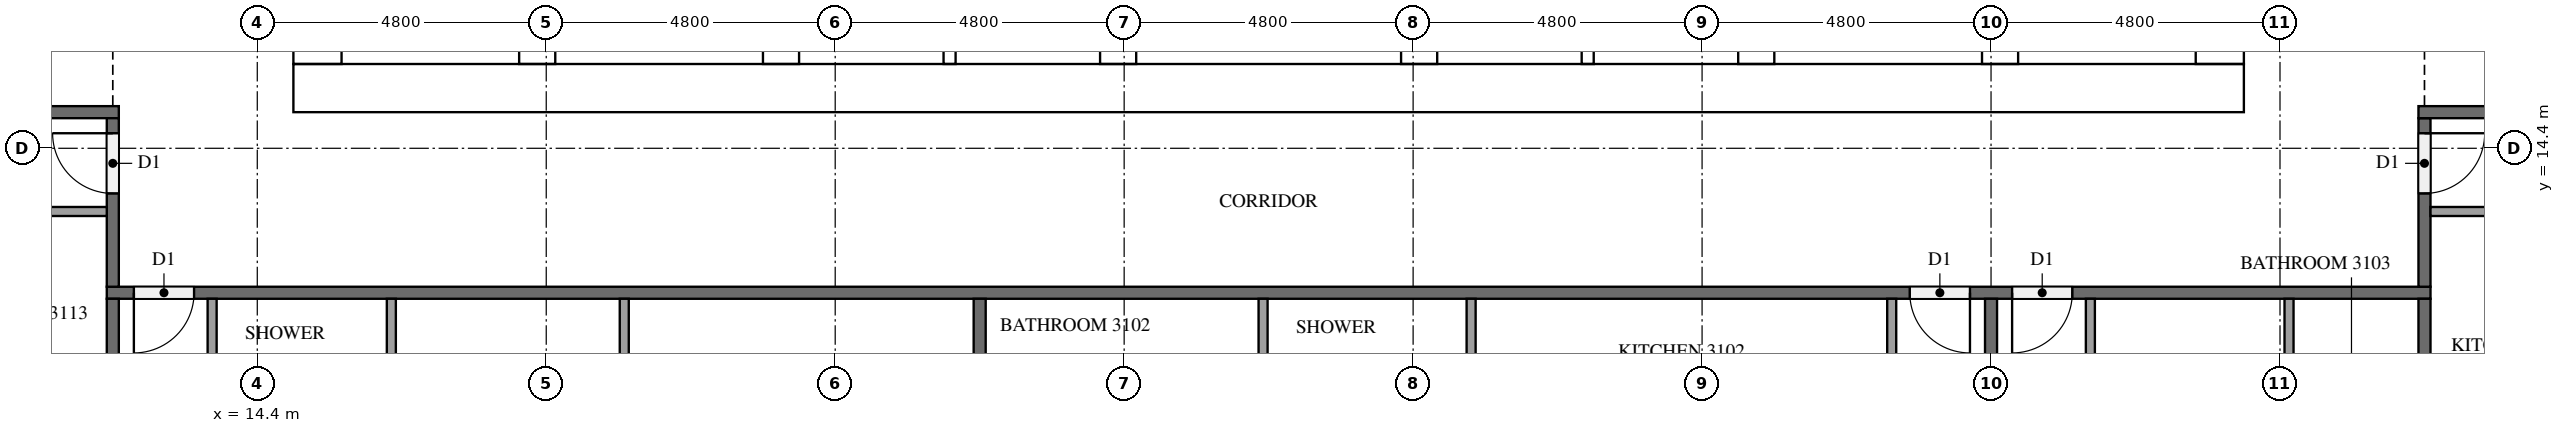
"""IFC4 building model, lengths in metres.
Left out: names, types, materials, properties, quantities, classifications, styles, units other than length and angle.
Written with IfcOpenShell. Run it as: python <this file> out.ifc"""

import sys

from ifc_helpers import new_model, si_unit, direction, frame, frame_2d, origin, place, context, subcontext, project, spatial, rectangle, extrude, element, fill, save


model = new_model("IFC4")
c1 = context("Model", 3, precision=1e-05, world=origin(), true_north=direction((0.0, 1.0)))
c2 = subcontext(c1, "Body", "Model", "MODEL_VIEW")
j1 = project(units=[si_unit("LENGTHUNIT", "METRE"), si_unit("PLANEANGLEUNIT", "RADIAN")], contexts=[c1])
p1 = place(None, origin())
s1 = spatial("IfcSite", under=j1, at=p1, CompositionType="ELEMENT")
p2 = place(p1, origin())
s2 = spatial("IfcBuilding", under=s1, at=p2, CompositionType="ELEMENT")
p3 = place(p2, frame((0.0, 0.0, 122.6)))
s3 = spatial("IfcBuildingStorey", under=s2, at=p3, CompositionType="ELEMENT", Elevation=122.6)
p4 = place(p3, frame((15.0, 15.4, 0.0), z_axis=(0.0, 0.0, 1.0), x_axis=(1.0, 0.0, 0.0)))
e1 = element("IfcWall", 1, at=p4, inside=s3, PredefinedType="SHEAR", context=c2, shape_type="SweptSolid", body=[
    extrude(rectangle(XDim=32.4, YDim=0.8, at=frame_2d((16.2, 0.0))), origin(), (0.0, 0.0, 1.0), 3.2),
])
p5 = place(p4, frame((15.3, 0.0, 0.0)))
e2 = element("IfcOpeningElement", 2, at=p5, cuts=e1, PredefinedType="OPENING", context=c2, shape_type="SweptSolid", body=[
    extrude(rectangle(XDim=1.8, YDim=2.1, at=frame_2d((0.9, 1.05))), frame((0.0, 0.41, 0.0), z_axis=(0.0, -1.0, 0.0), x_axis=(1.0, 0.0, 0.0)), (0.0, 0.0, 1.0), 0.82),
])
p6 = place(p3, frame((15.4, 15.8, 0.0), z_axis=(0.0, 0.0, 1.0), x_axis=(0.0, 1.0, 0.0)))
e3 = element("IfcWall", 3, at=p6, inside=s3, PredefinedType="SHEAR", context=c2, shape_type="SweptSolid", body=[
    extrude(rectangle(XDim=21.2, YDim=0.8, at=frame_2d((10.6, 0.0))), origin(), (0.0, 0.0, 1.0), 3.2),
])
p7 = place(p6, frame((4.96, 0.0, 0.0)))
e4 = element("IfcOpeningElement", 4, at=p7, cuts=e3, PredefinedType="OPENING", context=c2, shape_type="SweptSolid", body=[
    extrude(rectangle(XDim=1.2, YDim=2.1, at=frame_2d((0.6, 1.05))), frame((0.0, 0.41, 0.0), z_axis=(0.0, -1.0, 0.0), x_axis=(1.0, 0.0, 0.0)), (0.0, 0.0, 1.0), 0.82),
])
p8 = place(p3, frame((47.0, 15.8, 0.0), z_axis=(0.0, 0.0, 1.0), x_axis=(0.0, 1.0, 0.0)))
e5 = element("IfcWall", 5, at=p8, inside=s3, PredefinedType="SHEAR", context=c2, shape_type="SweptSolid", body=[
    extrude(rectangle(XDim=21.2, YDim=0.8, at=frame_2d((10.6, 0.0))), origin(), (0.0, 0.0, 1.0), 3.2),
])
p9 = place(p8, frame((10.3, 0.0, 0.0)))
e6 = element("IfcOpeningElement", 6, at=p9, cuts=e5, PredefinedType="OPENING", context=c2, shape_type="SweptSolid", body=[
    extrude(rectangle(XDim=1.2, YDim=2.1, at=frame_2d((0.6, 1.05))), frame((0.0, 0.41, 0.0), z_axis=(0.0, -1.0, 0.0), x_axis=(1.0, 0.0, 0.0)), (0.0, 0.0, 1.0), 0.82),
])
p10 = place(p3, frame((19.05, 15.8, 0.0), z_axis=(0.0, 0.0, 1.0), x_axis=(0.0, 1.0, 0.0)))
e7 = element("IfcWall", 7, at=p10, inside=s3, PredefinedType="SHEAR", context=c2, shape_type="SweptSolid", body=[
    extrude(rectangle(XDim=15.15, YDim=0.6, at=frame_2d((7.575, 0.0))), origin(), (0.0, 0.0, 1.0), 3.2),
])
p11 = place(p10, frame((9.65, 0.0, 0.0)))
e8 = element("IfcOpeningElement", 8, at=p11, cuts=e7, PredefinedType="OPENING", context=c2, shape_type="SweptSolid", body=[
    extrude(rectangle(XDim=1.1, YDim=2.1, at=frame_2d((0.55, 1.05))), frame((0.0, 0.31, 0.0), z_axis=(0.0, -1.0, 0.0), x_axis=(1.0, 0.0, 0.0)), (0.0, 0.0, 1.0), 0.62),
])
p12 = place(p10, frame((13.15, 0.0, 0.0)))
e9 = element("IfcOpeningElement", 9, at=p12, cuts=e7, PredefinedType="OPENING", context=c2, shape_type="SweptSolid", body=[
    extrude(rectangle(XDim=1.1, YDim=2.1, at=frame_2d((0.55, 1.05))), frame((0.0, 0.31, 0.0), z_axis=(0.0, -1.0, 0.0), x_axis=(1.0, 0.0, 0.0)), (0.0, 0.0, 1.0), 0.62),
])
p13 = place(p10, frame((0.4, 0.0, 0.0)))
e10 = element("IfcOpeningElement", 10, at=p13, cuts=e7, PredefinedType="OPENING", context=c2, shape_type="SweptSolid", body=[
    extrude(rectangle(XDim=1.2, YDim=2.1, at=frame_2d((0.6, 1.05))), frame((0.0, 0.31, 0.0), z_axis=(0.0, -1.0, 0.0), x_axis=(1.0, 0.0, 0.0)), (0.0, 0.0, 1.0), 0.62),
])
p14 = place(p3, frame((23.1, 15.8, 0.0), z_axis=(0.0, 0.0, 1.0), x_axis=(0.0, 1.0, 0.0)))
e11 = element("IfcWall", 11, at=p14, inside=s3, PredefinedType="SHEAR", context=c2, shape_type="SweptSolid", body=[
    extrude(rectangle(XDim=21.2, YDim=0.6, at=frame_2d((10.6, 0.0))), origin(), (0.0, 0.0, 1.0), 3.2),
])
p15 = place(p3, frame((39.3, 15.8, 0.0), z_axis=(0.0, 0.0, 1.0), x_axis=(0.0, 1.0, 0.0)))
e12 = element("IfcWall", 12, at=p15, inside=s3, PredefinedType="SHEAR", context=c2, shape_type="SweptSolid", body=[
    extrude(rectangle(XDim=8.45, YDim=0.6, at=frame_2d((4.225, 0.0))), origin(), (0.0, 0.0, 1.0), 3.2),
])
p16 = place(p3, frame((43.35, 15.8, 0.0), z_axis=(0.0, 0.0, 1.0), x_axis=(0.0, 1.0, 0.0)))
e13 = element("IfcWall", 13, at=p16, inside=s3, PredefinedType="SHEAR", context=c2, shape_type="SweptSolid", body=[
    extrude(rectangle(XDim=8.45, YDim=0.6, at=frame_2d((4.225, 0.0))), origin(), (0.0, 0.0, 1.0), 3.2),
])
p17 = place(p16, frame((0.4, 0.0, 0.0)))
e14 = element("IfcOpeningElement", 14, at=p17, cuts=e13, PredefinedType="OPENING", context=c2, shape_type="SweptSolid", body=[
    extrude(rectangle(XDim=1.2, YDim=2.1, at=frame_2d((0.6, 1.05))), frame((0.0, 0.31, 0.0), z_axis=(0.0, -1.0, 0.0), x_axis=(1.0, 0.0, 0.0)), (0.0, 0.0, 1.0), 0.62),
])
for number, where, z_axis, x_axis in (
    (15, (28.7, 15.8, 0.0), (0.0, 0.0, 1.0), (0.0, 1.0, 0.0)),
    (16, (33.7, 15.8, 0.0), (0.0, 0.0, 1.0), (0.0, 1.0, 0.0)),
):
    element("IfcWall", number, at=place(p3, frame(where, z_axis=z_axis, x_axis=x_axis)), inside=s3, PredefinedType="SHEAR", context=c2, shape_type="SweptSolid", body=[
        extrude(rectangle(XDim=2.65, YDim=0.6, at=frame_2d((1.325, 0.0))), origin(), (0.0, 0.0, 1.0), 3.2),
    ])
for number, where, z_axis, x_axis in (
    (17, (25.9, 15.8, 0.0), (0.0, 0.0, 1.0), (0.0, 1.0, 0.0)),
    (18, (36.5, 15.8, 0.0), (0.0, 0.0, 1.0), (0.0, 1.0, 0.0)),
):
    element("IfcWall", number, at=place(p3, frame(where, z_axis=z_axis, x_axis=x_axis)), inside=s3, PredefinedType="SOLIDWALL", context=c2, shape_type="SweptSolid", body=[
        extrude(rectangle(XDim=2.65, YDim=0.2, at=frame_2d((1.325, 0.0))), origin(), (0.0, 0.0, 1.0), 3.2),
    ])
p18 = place(p3, frame((50.5, 12.0, 0.0), z_axis=(0.0, 0.0, 1.0), x_axis=(-1.0, 0.0, 0.0)))
e19 = element("IfcWall", 19, at=p18, inside=s3, PredefinedType="PARTITIONING", context=c2, shape_type="SweptSolid", body=[
    extrude(rectangle(XDim=38.6, YDim=0.2, at=frame_2d((19.3, 0.0))), origin(), (0.0, 0.0, 1.0), 3.2),
])
p19 = place(p18, frame((37.15, 0.0, 0.0)))
e20 = element("IfcOpeningElement", 20, at=p19, cuts=e19, PredefinedType="OPENING", context=c2, shape_type="SweptSolid", body=[
    extrude(rectangle(XDim=1.0, YDim=2.1, at=frame_2d((0.5, 1.05))), frame((0.0, 0.11, 0.0), z_axis=(0.0, -1.0, 0.0), x_axis=(1.0, 0.0, 0.0)), (0.0, 0.0, 1.0), 0.22),
])
p20 = place(p18, frame((7.65, 0.0, 0.0)))
e21 = element("IfcOpeningElement", 21, at=p20, cuts=e19, PredefinedType="OPENING", context=c2, shape_type="SweptSolid", body=[
    extrude(rectangle(XDim=1.0, YDim=2.1, at=frame_2d((0.5, 1.05))), frame((0.0, 0.11, 0.0), z_axis=(0.0, -1.0, 0.0), x_axis=(1.0, 0.0, 0.0)), (0.0, 0.0, 1.0), 0.22),
])
p21 = place(p18, frame((5.95, 0.0, 0.0)))
e22 = element("IfcOpeningElement", 22, at=p21, cuts=e19, PredefinedType="OPENING", context=c2, shape_type="SweptSolid", body=[
    extrude(rectangle(XDim=1.0, YDim=2.1, at=frame_2d((0.5, 1.05))), frame((0.0, 0.11, 0.0), z_axis=(0.0, -1.0, 0.0), x_axis=(1.0, 0.0, 0.0)), (0.0, 0.0, 1.0), 0.22),
])
p22 = place(p3, frame((50.4, 14.9, 0.0), z_axis=(0.0, 0.0, 1.0), x_axis=(0.0, -1.0, 0.0)))
e23 = element("IfcWall", 23, at=p22, inside=s3, PredefinedType="PARTITIONING", context=c2, shape_type="SweptSolid", body=[
    extrude(rectangle(XDim=2.8, YDim=0.2, at=frame_2d((1.4, 0.0))), origin(), (0.0, 0.0, 1.0), 3.2),
])
p23 = place(p22, frame((0.25, 0.0, 0.0)))
e24 = element("IfcOpeningElement", 24, at=p23, cuts=e23, PredefinedType="OPENING", context=c2, shape_type="SweptSolid", body=[
    extrude(rectangle(XDim=1.0, YDim=2.1, at=frame_2d((0.5, 1.05))), frame((0.0, 0.11, 0.0), z_axis=(0.0, -1.0, 0.0), x_axis=(1.0, 0.0, 0.0)), (0.0, 0.0, 1.0), 0.22),
])
p24 = place(p3, frame((50.3, 15.0, 0.0), z_axis=(0.0, 0.0, 1.0), x_axis=(1.0, 0.0, 0.0)))
e25 = element("IfcWall", 25, at=p24, inside=s3, PredefinedType="PARTITIONING", context=c2, shape_type="SweptSolid", body=[
    extrude(rectangle(XDim=2.2, YDim=0.2, at=frame_2d((1.1, 0.0))), origin(), (0.0, 0.0, 1.0), 3.2),
])
p25 = place(p3, frame((9.9, 15.0, 0.0), z_axis=(0.0, 0.0, 1.0), x_axis=(1.0, 0.0, 0.0)))
e26 = element("IfcWall", 26, at=p25, inside=s3, PredefinedType="PARTITIONING", context=c2, shape_type="SweptSolid", body=[
    extrude(rectangle(XDim=2.2, YDim=0.2, at=frame_2d((1.1, 0.0))), origin(), (0.0, 0.0, 1.0), 3.2),
])
p26 = place(p3, frame((12.0, 12.1, 0.0), z_axis=(0.0, 0.0, 1.0), x_axis=(0.0, 1.0, 0.0)))
e27 = element("IfcWall", 27, at=p26, inside=s3, PredefinedType="PARTITIONING", context=c2, shape_type="SweptSolid", body=[
    extrude(rectangle(XDim=2.8, YDim=0.2, at=frame_2d((1.4, 0.0))), origin(), (0.0, 0.0, 1.0), 3.2),
])
p27 = place(p26, frame((1.55, 0.0, 0.0)))
e28 = element("IfcOpeningElement", 28, at=p27, cuts=e27, PredefinedType="OPENING", context=c2, shape_type="SweptSolid", body=[
    extrude(rectangle(XDim=1.0, YDim=2.1, at=frame_2d((0.5, 1.05))), frame((0.0, 0.11, 0.0), z_axis=(0.0, -1.0, 0.0), x_axis=(1.0, 0.0, 0.0)), (0.0, 0.0, 1.0), 0.22),
])
for number, where, z_axis, x_axis in (
    (29, (26.4, 11.9, 0.0), (0.0, 0.0, 1.0), (0.0, -1.0, 0.0)),
    (30, (12.0, 4.9, 0.0), (0.0, 0.0, 1.0), (0.0, 1.0, 0.0)),
):
    element("IfcWall", number, at=place(p3, frame(where, z_axis=z_axis, x_axis=x_axis)), inside=s3, PredefinedType="PARTITIONING", context=c2, shape_type="SweptSolid", body=[
        extrude(rectangle(XDim=7.0, YDim=0.2, at=frame_2d((3.5, 0.0))), origin(), (0.0, 0.0, 1.0), 3.2),
    ])
p28 = place(p3, frame((43.2, 11.9, 0.0), z_axis=(0.0, 0.0, 1.0), x_axis=(0.0, -1.0, 0.0)))
e31 = element("IfcWall", 31, at=p28, inside=s3, PredefinedType="PARTITIONING", context=c2, shape_type="SweptSolid", body=[
    extrude(rectangle(XDim=6.725, YDim=0.2, at=frame_2d((3.362, 0.0))), origin(), (0.0, 0.0, 1.0), 3.2),
])
p29 = place(p3, frame((50.4, 11.9, 0.0), z_axis=(0.0, 0.0, 1.0), x_axis=(0.0, -1.0, 0.0)))
e32 = element("IfcWall", 32, at=p29, inside=s3, PredefinedType="PARTITIONING", context=c2, shape_type="SweptSolid", body=[
    extrude(rectangle(XDim=7.0, YDim=0.2, at=frame_2d((3.5, 0.0))), origin(), (0.0, 0.0, 1.0), 3.2),
])
for number, where, z_axis, x_axis in (
    (33, (16.627, 11.9, 0.0), (0.0, 0.0, 1.0), (0.0, -1.0, 0.0)),
    (34, (20.496, 11.9, 0.0), (0.0, 0.0, 1.0), (0.0, -1.0, 0.0)),
):
    element("IfcWall", number, at=place(p3, frame(where, z_axis=z_axis, x_axis=x_axis)), inside=s3, PredefinedType="PARTITIONING", context=c2, shape_type="SweptSolid", body=[
        extrude(rectangle(XDim=2.225, YDim=0.15, at=frame_2d((1.112, 0.0))), origin(), (0.0, 0.0, 1.0), 3.2),
    ])
p30 = place(p3, frame((13.65, 11.9, 0.0), z_axis=(0.0, 0.0, 1.0), x_axis=(0.0, -1.0, 0.0)))
e35 = element("IfcWall", 35, at=p30, inside=s3, PredefinedType="PARTITIONING", context=c2, shape_type="SweptSolid", body=[
    extrude(rectangle(XDim=2.375, YDim=0.15, at=frame_2d((1.188, 0.0))), origin(), (0.0, 0.0, 1.0), 3.2),
])
for number, where, z_axis, x_axis in (
    (36, (34.563, 11.9, 0.0), (0.0, 0.0, 1.0), (0.0, -1.0, 0.0)),
    (37, (31.108, 11.9, 0.0), (0.0, 0.0, 1.0), (0.0, -1.0, 0.0)),
):
    element("IfcWall", number, at=place(p3, frame(where, z_axis=z_axis, x_axis=x_axis)), inside=s3, PredefinedType="PARTITIONING", context=c2, shape_type="SweptSolid", body=[
        extrude(rectangle(XDim=1.775, YDim=0.15, at=frame_2d((0.887, 0.0))), origin(), (0.0, 0.0, 1.0), 3.2),
    ])
p31 = place(p3, frame((41.55, 11.9, 0.0), z_axis=(0.0, 0.0, 1.0), x_axis=(0.0, -1.0, 0.0)))
e38 = element("IfcWall", 38, at=p31, inside=s3, PredefinedType="PARTITIONING", context=c2, shape_type="SweptSolid", body=[
    extrude(rectangle(XDim=1.925, YDim=0.15, at=frame_2d((0.962, 0.0))), origin(), (0.0, 0.0, 1.0), 3.2),
])
p32 = place(p3, frame((48.15, 11.9, 0.0), z_axis=(0.0, 0.0, 1.0), x_axis=(0.0, -1.0, 0.0)))
e39 = element("IfcWall", 39, at=p32, inside=s3, PredefinedType="PARTITIONING", context=c2, shape_type="SweptSolid", body=[
    extrude(rectangle(XDim=2.375, YDim=0.15, at=frame_2d((1.188, 0.0))), origin(), (0.0, 0.0, 1.0), 3.2),
])
p33 = place(p3, frame((44.85, 11.9, 0.0), z_axis=(0.0, 0.0, 1.0), x_axis=(0.0, -1.0, 0.0)))
e40 = element("IfcWall", 40, at=p33, inside=s3, PredefinedType="PARTITIONING", context=c2, shape_type="SweptSolid", body=[
    extrude(rectangle(XDim=2.525, YDim=0.15, at=frame_2d((1.262, 0.0))), origin(), (0.0, 0.0, 1.0), 3.2),
])
p34 = place(p3, frame((50.5, 13.35, 0.0), z_axis=(0.0, 0.0, 1.0), x_axis=(1.0, 0.0, 0.0)))
e41 = element("IfcWall", 41, at=p34, inside=s3, PredefinedType="PARTITIONING", context=c2, shape_type="SweptSolid", body=[
    extrude(rectangle(XDim=2.225, YDim=0.15, at=frame_2d((1.113, 0.0))), origin(), (0.0, 0.0, 1.0), 3.2),
])
p35 = place(p3, frame((11.9, 13.35, 0.0), z_axis=(0.0, 0.0, 1.0), x_axis=(-1.0, 0.0, 0.0)))
e42 = element("IfcWall", 42, at=p35, inside=s3, PredefinedType="PARTITIONING", context=c2, shape_type="SweptSolid", body=[
    extrude(rectangle(XDim=3.275, YDim=0.15, at=frame_2d((1.637, 0.0))), origin(), (0.0, 0.0, 1.0), 3.2),
])
p36 = place(p5, frame((1.8, 0.0, 0.0), z_axis=(0.0, 0.0, 1.0), x_axis=(-1.0, 0.0, 0.0)))
e43 = element("IfcDoor", 43, at=p36, inside=s3, OperationType="DOUBLE_DOOR_SINGLE_SWING", PredefinedType="DOOR", context=c2, shape_type="SweptSolid", body=[
    extrude(rectangle(XDim=1.8, YDim=2.1, at=frame_2d((0.9, 1.05))), frame((0.0, 0.025, 0.0), z_axis=(0.0, -1.0, 0.0), x_axis=(1.0, 0.0, 0.0)), (0.0, 0.0, 1.0), 0.05),
])
fill(e2, e43)
p37 = place(p19, origin())
e44 = element("IfcDoor", 44, at=p37, inside=s3, OperationType="SINGLE_SWING_RIGHT", PredefinedType="DOOR", context=c2, shape_type="SweptSolid", body=[
    extrude(rectangle(XDim=1.0, YDim=2.1, at=frame_2d((0.5, 1.05))), frame((0.0, 0.025, 0.0), z_axis=(0.0, -1.0, 0.0), x_axis=(1.0, 0.0, 0.0)), (0.0, 0.0, 1.0), 0.05),
])
fill(e20, e44)
p38 = place(p20, origin())
e45 = element("IfcDoor", 45, at=p38, inside=s3, OperationType="SINGLE_SWING_LEFT", PredefinedType="DOOR", context=c2, shape_type="SweptSolid", body=[
    extrude(rectangle(XDim=1.0, YDim=2.1, at=frame_2d((0.5, 1.05))), frame((0.0, 0.025, 0.0), z_axis=(0.0, -1.0, 0.0), x_axis=(1.0, 0.0, 0.0)), (0.0, 0.0, 1.0), 0.05),
])
fill(e21, e45)
p39 = place(p21, origin())
e46 = element("IfcDoor", 46, at=p39, inside=s3, OperationType="SINGLE_SWING_RIGHT", PredefinedType="DOOR", context=c2, shape_type="SweptSolid", body=[
    extrude(rectangle(XDim=1.0, YDim=2.1, at=frame_2d((0.5, 1.05))), frame((0.0, 0.025, 0.0), z_axis=(0.0, -1.0, 0.0), x_axis=(1.0, 0.0, 0.0)), (0.0, 0.0, 1.0), 0.05),
])
fill(e22, e46)
p40 = place(p23, origin())
e47 = element("IfcDoor", 47, at=p40, inside=s3, OperationType="SINGLE_SWING_LEFT", PredefinedType="DOOR", context=c2, shape_type="SweptSolid", body=[
    extrude(rectangle(XDim=1.0, YDim=2.1, at=frame_2d((0.5, 1.05))), frame((0.0, 0.025, 0.0), z_axis=(0.0, -1.0, 0.0), x_axis=(1.0, 0.0, 0.0)), (0.0, 0.0, 1.0), 0.05),
])
fill(e24, e47)
p41 = place(p27, origin())
e48 = element("IfcDoor", 48, at=p41, inside=s3, OperationType="SINGLE_SWING_RIGHT", PredefinedType="DOOR", context=c2, shape_type="SweptSolid", body=[
    extrude(rectangle(XDim=1.0, YDim=2.1, at=frame_2d((0.5, 1.05))), frame((0.0, 0.025, 0.0), z_axis=(0.0, -1.0, 0.0), x_axis=(1.0, 0.0, 0.0)), (0.0, 0.0, 1.0), 0.05),
])
fill(e28, e48)
save(model, sys.argv[1])
